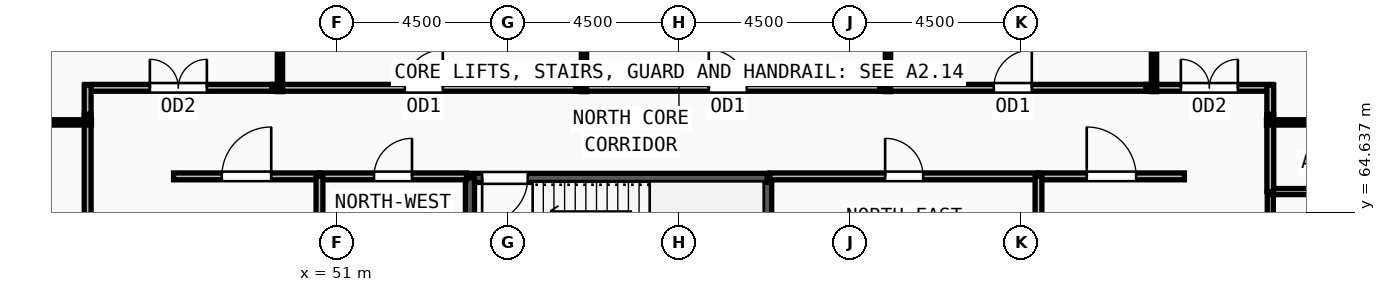
"""IFC4 building model, lengths in metres.
Left out: names, types, materials, properties, quantities, classifications, styles, units other than length and angle.
Written with IfcOpenShell. Run it as: python <this file> out.ifc"""

import sys

from ifc_helpers import new_model, si_unit, direction, frame, frame_2d, origin, place, context, subcontext, project, spatial, rectangle, extrude, source, transform, mapped, element, fill, save


model = new_model("IFC4")
c1 = context("Model", 3, precision=1e-05, world=origin(), true_north=direction((0.0, 1.0)))
c2 = subcontext(c1, "Body", "Model", "MODEL_VIEW")
j1 = project(units=[si_unit("LENGTHUNIT", "METRE"), si_unit("PLANEANGLEUNIT", "RADIAN")], contexts=[c1])
p1 = place(None, origin())
s1 = spatial("IfcSite", under=j1, at=p1, CompositionType="ELEMENT")
p2 = place(p1, origin())
s2 = spatial("IfcBuilding", under=s1, at=p2, CompositionType="ELEMENT")
p3 = place(p2, frame((0.0, 0.0, 155.25)))
s3 = spatial("IfcBuildingStorey", under=s2, at=p3, CompositionType="ELEMENT", Elevation=155.25)
p4 = place(p3, frame((62.32, 62.1, 0.0), z_axis=(0.0, 0.0, 1.0), x_axis=(0.0, 1.0, 0.0)))
e1 = element("IfcWall", 1, at=p4, inside=s3, PredefinedType="SOLIDWALL", context=c2, shape_type="SweptSolid", body=[
    extrude(rectangle(XDim=3.44, YDim=0.24, at=frame_2d((1.72, 0.0))), origin(), (0.0, 0.0, 1.0), 3.57),
])
p5 = place(p3, frame((62.32, 65.54, 0.0), z_axis=(0.0, 0.0, 1.0), x_axis=(-1.0, 0.0, 0.0)))
e2 = element("IfcWall", 2, at=p5, inside=s3, PredefinedType="SOLIDWALL", context=c2, shape_type="SweptSolid", body=[
    extrude(rectangle(XDim=7.82, YDim=0.24, at=frame_2d((3.91, 0.0))), origin(), (0.0, 0.0, 1.0), 3.57),
])
m1 = source(origin(), c2, "Body", "SweptSolid", [
    extrude(rectangle(XDim=1.2, YDim=2.2, at=frame_2d((0.6, 1.1))), frame((0.0, 0.13, 0.0), z_axis=(0.0, -1.0, 0.0), x_axis=(1.0, 0.0, 0.0)), (0.0, 0.0, 1.0), 0.26),
])
p6 = place(p5, frame((6.3, 0.0, 0.0)))
e3 = element("IfcOpeningElement", 3, at=p6, cuts=e2, PredefinedType="OPENING", context=c2, shape_type="MappedRepresentation", body=[
    mapped(m1, transform((0.0, 0.0, 0.0), x_axis=(1.0, 0.0, 0.0), y_axis=(0.0, 1.0, 0.0), z_axis=(0.0, 0.0, 1.0), scale=1.0)),
])
p7 = place(p3, frame((54.5, 65.54, 0.0), z_axis=(0.0, 0.0, 1.0), x_axis=(0.0, -1.0, 0.0)))
e4 = element("IfcWall", 4, at=p7, inside=s3, PredefinedType="SOLIDWALL", context=c2, shape_type="SweptSolid", body=[
    extrude(rectangle(XDim=3.44, YDim=0.24, at=frame_2d((1.72, 0.0))), origin(), (0.0, 0.0, 1.0), 3.57),
])
p8 = place(p3, frame((75.56, 62.44, 0.0), z_axis=(0.0, 0.0, 1.0), x_axis=(0.0, 1.0, 0.0)))
e5 = element("IfcWall", 5, at=p8, inside=s3, PredefinedType="PARTITIONING", context=c2, shape_type="SweptSolid", body=[
    extrude(rectangle(XDim=2.74, YDim=0.16, at=frame_2d((1.37, 0.0))), origin(), (0.0, 0.0, 1.0), 3.57),
])
m2 = source(origin(), c2, "Body", "SweptSolid", [
    extrude(rectangle(XDim=1.05, YDim=2.15, at=frame_2d((0.525, 1.075))), frame((0.0, 0.09, 0.0), z_axis=(0.0, -1.0, 0.0), x_axis=(1.0, 0.0, 0.0)), (0.0, 0.0, 1.0), 0.18),
])
p9 = place(p8, frame((0.845, 0.0, 0.0)))
e6 = element("IfcOpeningElement", 6, at=p9, cuts=e5, PredefinedType="OPENING", context=c2, shape_type="MappedRepresentation", body=[
    mapped(m2, transform((0.0, 0.0, 0.0), x_axis=(1.0, 0.0, 0.0), y_axis=(0.0, 1.0, 0.0), z_axis=(0.0, 0.0, 1.0), scale=1.0)),
])
p10 = place(p3, frame((50.54, 65.58, 0.0), z_axis=(0.0, 0.0, 1.0), x_axis=(1.0, 0.0, 0.0)))
e7 = element("IfcWall", 7, at=p10, inside=s3, PredefinedType="PARTITIONING", context=c2, shape_type="SweptSolid", body=[
    extrude(rectangle(XDim=3.87, YDim=0.18, at=frame_2d((1.935, 0.0))), origin(), (0.0, 0.0, 1.0), 3.57),
])
m3 = source(origin(), c2, "Body", "SweptSolid", [
    extrude(rectangle(XDim=1.0, YDim=2.2, at=frame_2d((0.5, 1.1))), frame((0.0, 0.1, 0.0), z_axis=(0.0, -1.0, 0.0), x_axis=(1.0, 0.0, 0.0)), (0.0, 0.0, 1.0), 0.2),
])
p11 = place(p10, frame((1.435, 0.0, 0.0)))
e8 = element("IfcOpeningElement", 8, at=p11, cuts=e7, PredefinedType="OPENING", context=c2, shape_type="MappedRepresentation", body=[
    mapped(m3, transform((0.0, 0.0, 0.0), x_axis=(1.0, 0.0, 0.0), y_axis=(0.0, 1.0, 0.0), z_axis=(0.0, 0.0, 1.0), scale=1.0)),
])
p12 = place(p3, frame((62.39, 65.58, 0.0), z_axis=(0.0, 0.0, 1.0), x_axis=(1.0, 0.0, 0.0)))
e9 = element("IfcWall", 9, at=p12, inside=s3, PredefinedType="PARTITIONING", context=c2, shape_type="SweptSolid", body=[
    extrude(rectangle(XDim=7.07, YDim=0.18, at=frame_2d((3.535, 0.0))), origin(), (0.0, 0.0, 1.0), 3.57),
])
p13 = place(p12, frame((3.035, 0.0, 0.0)))
e10 = element("IfcOpeningElement", 10, at=p13, cuts=e9, PredefinedType="OPENING", context=c2, shape_type="MappedRepresentation", body=[
    mapped(m3, transform((0.0, 0.0, 0.0), x_axis=(1.0, 0.0, 0.0), y_axis=(0.0, 1.0, 0.0), z_axis=(0.0, 0.0, 1.0), scale=1.0)),
])
p14 = place(p3, frame((46.7, 65.58, 0.0), z_axis=(0.0, 0.0, 1.0), x_axis=(1.0, 0.0, 0.0)))
e11 = element("IfcWall", 11, at=p14, inside=s3, PredefinedType="PARTITIONING", context=c2, shape_type="SweptSolid", body=[
    extrude(rectangle(XDim=3.84, YDim=0.18, at=frame_2d((1.92, 0.0))), origin(), (0.0, 0.0, 1.0), 3.57),
])
m4 = source(origin(), c2, "Body", "SweptSolid", [
    extrude(rectangle(XDim=1.3, YDim=2.2, at=frame_2d((0.65, 1.1))), frame((0.0, 0.1, 0.0), z_axis=(0.0, -1.0, 0.0), x_axis=(1.0, 0.0, 0.0)), (0.0, 0.0, 1.0), 0.2),
])
p15 = place(p14, frame((1.27, 0.0, 0.0)))
e12 = element("IfcOpeningElement", 12, at=p15, cuts=e11, PredefinedType="OPENING", context=c2, shape_type="MappedRepresentation", body=[
    mapped(m4, transform((0.0, 0.0, 0.0), x_axis=(1.0, 0.0, 0.0), y_axis=(0.0, 1.0, 0.0), z_axis=(0.0, 0.0, 1.0), scale=1.0)),
])
p16 = place(p3, frame((69.46, 65.58, 0.0), z_axis=(0.0, 0.0, 1.0), x_axis=(1.0, 0.0, 0.0)))
e13 = element("IfcWall", 13, at=p16, inside=s3, PredefinedType="PARTITIONING", context=c2, shape_type="SweptSolid", body=[
    extrude(rectangle(XDim=3.84, YDim=0.18, at=frame_2d((1.92, 0.0))), origin(), (0.0, 0.0, 1.0), 3.57),
])
p17 = place(p16, frame((1.27, 0.0, 0.0)))
e14 = element("IfcOpeningElement", 14, at=p17, cuts=e13, PredefinedType="OPENING", context=c2, shape_type="MappedRepresentation", body=[
    mapped(m4, transform((0.0, 0.0, 0.0), x_axis=(1.0, 0.0, 0.0), y_axis=(0.0, 1.0, 0.0), z_axis=(0.0, 0.0, 1.0), scale=1.0)),
])
p18 = place(p3, frame((72.285, 67.91, 0.0), z_axis=(0.0, 0.0, 1.0), x_axis=(1.0, 0.0, 0.0)))
e15 = element("IfcWall", 15, at=p18, inside=s3, PredefinedType="PARTITIONING", context=c2, shape_type="SweptSolid", body=[
    extrude(rectangle(XDim=3.345, YDim=0.18, at=frame_2d((1.672, 0.0))), origin(), (0.0, 0.0, 1.0), 3.57),
])
m5 = source(origin(), c2, "Body", "SweptSolid", [
    extrude(rectangle(XDim=1.5, YDim=2.2, at=frame_2d((0.75, 1.1))), frame((0.0, 0.1, 0.0), z_axis=(0.0, -1.0, 0.0), x_axis=(1.0, 0.0, 0.0)), (0.0, 0.0, 1.0), 0.2),
])
p19 = place(p18, frame((0.922, 0.0, 0.0)))
e16 = element("IfcOpeningElement", 16, at=p19, cuts=e15, PredefinedType="OPENING", context=c2, shape_type="MappedRepresentation", body=[
    mapped(m5, transform((0.0, 0.0, 0.0), x_axis=(1.0, 0.0, 0.0), y_axis=(0.0, 1.0, 0.0), z_axis=(0.0, 0.0, 1.0), scale=1.0)),
])
p20 = place(p3, frame((65.285, 67.91, 0.0), z_axis=(0.0, 0.0, 1.0), x_axis=(1.0, 0.0, 0.0)))
e17 = element("IfcWall", 17, at=p20, inside=s3, PredefinedType="PARTITIONING", context=c2, shape_type="SweptSolid", body=[
    extrude(rectangle(XDim=7.0, YDim=0.18, at=frame_2d((3.5, 0.0))), origin(), (0.0, 0.0, 1.0), 3.57),
])
p21 = place(p20, frame((3.0, 0.0, 0.0)))
e18 = element("IfcOpeningElement", 18, at=p21, cuts=e17, PredefinedType="OPENING", context=c2, shape_type="MappedRepresentation", body=[
    mapped(m3, transform((0.0, 0.0, 0.0), x_axis=(1.0, 0.0, 0.0), y_axis=(0.0, 1.0, 0.0), z_axis=(0.0, 0.0, 1.0), scale=1.0)),
])
p22 = place(p3, frame((57.285, 67.91, 0.0), z_axis=(0.0, 0.0, 1.0), x_axis=(1.0, 0.0, 0.0)))
e19 = element("IfcWall", 19, at=p22, inside=s3, PredefinedType="PARTITIONING", context=c2, shape_type="SweptSolid", body=[
    extrude(rectangle(XDim=8.0, YDim=0.18, at=frame_2d((4.0, 0.0))), origin(), (0.0, 0.0, 1.0), 3.57),
])
p23 = place(p22, frame((3.5, 0.0, 0.0)))
e20 = element("IfcOpeningElement", 20, at=p23, cuts=e19, PredefinedType="OPENING", context=c2, shape_type="MappedRepresentation", body=[
    mapped(m3, transform((0.0, 0.0, 0.0), x_axis=(1.0, 0.0, 0.0), y_axis=(0.0, 1.0, 0.0), z_axis=(0.0, 0.0, 1.0), scale=1.0)),
])
p24 = place(p3, frame((49.285, 67.91, 0.0), z_axis=(0.0, 0.0, 1.0), x_axis=(1.0, 0.0, 0.0)))
e21 = element("IfcWall", 21, at=p24, inside=s3, PredefinedType="PARTITIONING", context=c2, shape_type="SweptSolid", body=[
    extrude(rectangle(XDim=8.0, YDim=0.18, at=frame_2d((4.0, 0.0))), origin(), (0.0, 0.0, 1.0), 3.57),
])
p25 = place(p24, frame((3.5, 0.0, 0.0)))
e22 = element("IfcOpeningElement", 22, at=p25, cuts=e21, PredefinedType="OPENING", context=c2, shape_type="MappedRepresentation", body=[
    mapped(m3, transform((0.0, 0.0, 0.0), x_axis=(1.0, 0.0, 0.0), y_axis=(0.0, 1.0, 0.0), z_axis=(0.0, 0.0, 1.0), scale=1.0)),
])
p26 = place(p3, frame((44.37, 67.91, 0.0), z_axis=(0.0, 0.0, 1.0), x_axis=(1.0, 0.0, 0.0)))
e23 = element("IfcWall", 23, at=p26, inside=s3, PredefinedType="PARTITIONING", context=c2, shape_type="SweptSolid", body=[
    extrude(rectangle(XDim=4.915, YDim=0.18, at=frame_2d((2.458, 0.0))), origin(), (0.0, 0.0, 1.0), 3.57),
])
p27 = place(p26, frame((1.707, 0.0, 0.0)))
e24 = element("IfcOpeningElement", 24, at=p27, cuts=e23, PredefinedType="OPENING", context=c2, shape_type="MappedRepresentation", body=[
    mapped(m5, transform((0.0, 0.0, 0.0), x_axis=(1.0, 0.0, 0.0), y_axis=(0.0, 1.0, 0.0), z_axis=(0.0, 0.0, 1.0), scale=1.0)),
])
p28 = place(p3, frame((44.44, 60.785, 0.0), z_axis=(0.0, 0.0, 1.0), x_axis=(0.0, 1.0, 0.0)))
e25 = element("IfcWall", 25, at=p28, inside=s3, PredefinedType="PARTITIONING", context=c2, shape_type="SweptSolid", body=[
    extrude(rectangle(XDim=6.43, YDim=0.18, at=frame_2d((3.215, 0.0))), origin(), (0.0, 0.0, 1.0), 3.57),
])
p29 = place(p28, frame((2.715, 0.0, 0.0)))
e26 = element("IfcOpeningElement", 26, at=p29, cuts=e25, PredefinedType="OPENING", context=c2, shape_type="MappedRepresentation", body=[
    mapped(m3, transform((0.0, 0.0, 0.0), x_axis=(1.0, 0.0, 0.0), y_axis=(0.0, 1.0, 0.0), z_axis=(0.0, 0.0, 1.0), scale=1.0)),
])
p30 = place(p3, frame((75.56, 65.18, 0.0), z_axis=(0.0, 0.0, 1.0), x_axis=(1.0, 0.0, 0.0)))
e27 = element("IfcWall", 27, at=p30, inside=s3, PredefinedType="PARTITIONING", context=c2, shape_type="SweptSolid", body=[
    extrude(rectangle(XDim=4.46, YDim=0.16, at=frame_2d((2.23, 0.0))), origin(), (0.0, 0.0, 1.0), 3.57),
])
for number, where, z_axis, x_axis in (
    (28, (50.54, 61.95, 0.0), (0.0, 0.0, 1.0), (0.0, 1.0, 0.0)),
    (29, (69.46, 61.95, 0.0), (0.0, 0.0, 1.0), (0.0, 1.0, 0.0)),
):
    element("IfcWall", number, at=place(p3, frame(where, z_axis=z_axis, x_axis=x_axis)), inside=s3, PredefinedType="PARTITIONING", context=c2, shape_type="SweptSolid", body=[
        extrude(rectangle(XDim=3.63, YDim=0.18, at=frame_2d((1.815, 0.0))), origin(), (0.0, 0.0, 1.0), 3.57),
    ])
p31 = place(p3, frame((75.56, 67.215, 0.0), z_axis=(0.0, 0.0, 1.0), x_axis=(0.0, -1.0, 0.0)))
e30 = element("IfcWall", 30, at=p31, inside=s3, PredefinedType="PARTITIONING", context=c2, shape_type="SweptSolid", body=[
    extrude(rectangle(XDim=2.035, YDim=0.18, at=frame_2d((1.018, 0.0))), origin(), (0.0, 0.0, 1.0), 3.57),
])
for number, where, z_axis, x_axis in (
    (31, (75.56, 67.98, 0.0), (0.0, 0.0, 1.0), (0.0, -1.0, 0.0)),
    (32, (44.44, 67.215, 0.0), (0.0, 0.0, 1.0), (0.0, 1.0, 0.0)),
):
    element("IfcWall", number, at=place(p3, frame(where, z_axis=z_axis, x_axis=x_axis)), inside=s3, PredefinedType="PARTITIONING", context=c2, shape_type="SweptSolid", body=[
        extrude(rectangle(XDim=0.765, YDim=0.18, at=frame_2d((0.382, 0.0))), origin(), (0.0, 0.0, 1.0), 3.57),
    ])
p32 = place(p3, frame((44.54, 67.0, 0.0), z_axis=(0.0, 0.0, 1.0), x_axis=(-1.0, 0.0, 0.0)))
e33 = element("IfcWall", 33, at=p32, inside=s3, PredefinedType="PARTITIONING", context=c2, shape_type="SweptSolid", body=[
    extrude(rectangle(XDim=20.033, YDim=0.14, at=frame_2d((10.017, 0.0))), origin(), (0.0, 0.0, 1.0), 2.755),
])
p33 = place(p3, frame((75.46, 67.0, 0.0), z_axis=(0.0, 0.0, 1.0), x_axis=(1.0, 0.0, 0.0)))
e34 = element("IfcWall", 34, at=p33, inside=s3, PredefinedType="PARTITIONING", context=c2, shape_type="SweptSolid", body=[
    extrude(rectangle(XDim=20.046, YDim=0.14, at=frame_2d((10.023, 0.0))), origin(), (0.0, 0.0, 1.0), 2.755),
])
p34 = place(p3, frame((49.5, 67.81, 0.0), z_axis=(0.0, 0.0, 1.0), x_axis=(0.0, 1.0, 0.0)))
e35 = element("IfcWall", 35, at=p34, inside=s3, PredefinedType="PARTITIONING", context=c2, shape_type="SweptSolid", body=[
    extrude(rectangle(XDim=11.767, YDim=0.14, at=frame_2d((5.883, 0.0))), origin(), (0.0, 0.0, 1.0), 3.57),
])
p35 = place(p3, frame((57.5, 67.81, 0.0), z_axis=(0.0, 0.0, 1.0), x_axis=(0.0, 1.0, 0.0)))
e36 = element("IfcWall", 36, at=p35, inside=s3, PredefinedType="PARTITIONING", context=c2, shape_type="SweptSolid", body=[
    extrude(rectangle(XDim=12.315, YDim=0.14, at=frame_2d((6.157, 0.0))), origin(), (0.0, 0.0, 1.0), 3.57),
])
p36 = place(p3, frame((65.5, 67.81, 0.0), z_axis=(0.0, 0.0, 1.0), x_axis=(0.0, 1.0, 0.0)))
e37 = element("IfcWall", 37, at=p36, inside=s3, PredefinedType="PARTITIONING", context=c2, shape_type="SweptSolid", body=[
    extrude(rectangle(XDim=11.835, YDim=0.14, at=frame_2d((5.917, 0.0))), origin(), (0.0, 0.0, 1.0), 3.57),
])
p37 = place(p3, frame((72.5, 67.81, 0.0), z_axis=(0.0, 0.0, 1.0), x_axis=(0.0, 1.0, 0.0)))
e38 = element("IfcWall", 38, at=p37, inside=s3, PredefinedType="PARTITIONING", context=c2, shape_type="SweptSolid", body=[
    extrude(rectangle(XDim=11.416, YDim=0.14, at=frame_2d((5.708, 0.0))), origin(), (0.0, 0.0, 1.0), 3.57),
])
m6 = source(origin(), c2, "Body", "SweptSolid", [
    extrude(rectangle(XDim=1.2, YDim=2.2, at=frame_2d((0.6, 1.1))), frame((0.0, 0.025, 0.0), z_axis=(0.0, -1.0, 0.0), x_axis=(1.0, 0.0, 0.0)), (0.0, 0.0, 1.0), 0.05),
])
p38 = place(p6, origin())
e39 = element("IfcDoor", 39, at=p38, inside=s3, OperationType="SINGLE_SWING_RIGHT", PredefinedType="DOOR", context=c2, shape_type="MappedRepresentation", body=[
    mapped(m6, transform((0.0, 0.0, 0.0), x_axis=(1.0, 0.0, 0.0), y_axis=(0.0, 1.0, 0.0), z_axis=(0.0, 0.0, 1.0), scale=1.0)),
])
fill(e3, e39)
m7 = source(origin(), c2, "Body", "SweptSolid", [
    extrude(rectangle(XDim=1.0, YDim=2.2, at=frame_2d((0.5, 1.1))), frame((0.0, 0.025, 0.0), z_axis=(0.0, -1.0, 0.0), x_axis=(1.0, 0.0, 0.0)), (0.0, 0.0, 1.0), 0.05),
])
p39 = place(p11, origin())
e40 = element("IfcDoor", 40, at=p39, inside=s3, OperationType="SINGLE_SWING_RIGHT", PredefinedType="DOOR", context=c2, shape_type="MappedRepresentation", body=[
    mapped(m7, transform((0.0, 0.0, 0.0), x_axis=(1.0, 0.0, 0.0), y_axis=(0.0, 1.0, 0.0), z_axis=(0.0, 0.0, 1.0), scale=1.0)),
])
fill(e8, e40)
p40 = place(p13, origin())
e41 = element("IfcDoor", 41, at=p40, inside=s3, OperationType="SINGLE_SWING_LEFT", PredefinedType="DOOR", context=c2, shape_type="MappedRepresentation", body=[
    mapped(m7, transform((0.0, 0.0, 0.0), x_axis=(1.0, 0.0, 0.0), y_axis=(0.0, 1.0, 0.0), z_axis=(0.0, 0.0, 1.0), scale=1.0)),
])
fill(e10, e41)
m8 = source(origin(), c2, "Body", "SweptSolid", [
    extrude(rectangle(XDim=1.3, YDim=2.2, at=frame_2d((0.65, 1.1))), frame((0.0, 0.025, 0.0), z_axis=(0.0, -1.0, 0.0), x_axis=(1.0, 0.0, 0.0)), (0.0, 0.0, 1.0), 0.05),
])
p41 = place(p15, origin())
e42 = element("IfcDoor", 42, at=p41, inside=s3, OperationType="SINGLE_SWING_RIGHT", PredefinedType="DOOR", context=c2, shape_type="MappedRepresentation", body=[
    mapped(m8, transform((0.0, 0.0, 0.0), x_axis=(1.0, 0.0, 0.0), y_axis=(0.0, 1.0, 0.0), z_axis=(0.0, 0.0, 1.0), scale=1.0)),
])
fill(e12, e42)
p42 = place(p17, origin())
e43 = element("IfcDoor", 43, at=p42, inside=s3, OperationType="SINGLE_SWING_LEFT", PredefinedType="DOOR", context=c2, shape_type="MappedRepresentation", body=[
    mapped(m8, transform((0.0, 0.0, 0.0), x_axis=(1.0, 0.0, 0.0), y_axis=(0.0, 1.0, 0.0), z_axis=(0.0, 0.0, 1.0), scale=1.0)),
])
fill(e14, e43)
m9 = source(origin(), c2, "Body", "SweptSolid", [
    extrude(rectangle(XDim=1.5, YDim=2.2, at=frame_2d((0.75, 1.1))), frame((0.0, 0.025, 0.0), z_axis=(0.0, -1.0, 0.0), x_axis=(1.0, 0.0, 0.0)), (0.0, 0.0, 1.0), 0.05),
])
p43 = place(p19, origin())
e44 = element("IfcDoor", 44, at=p43, inside=s3, OperationType="DOUBLE_DOOR_SINGLE_SWING", PredefinedType="DOOR", context=c2, shape_type="MappedRepresentation", body=[
    mapped(m9, transform((0.0, 0.0, 0.0), x_axis=(1.0, 0.0, 0.0), y_axis=(0.0, 1.0, 0.0), z_axis=(0.0, 0.0, 1.0), scale=1.0)),
])
fill(e16, e44)
p44 = place(p21, origin())
e45 = element("IfcDoor", 45, at=p44, inside=s3, OperationType="SINGLE_SWING_RIGHT", PredefinedType="DOOR", context=c2, shape_type="MappedRepresentation", body=[
    mapped(m7, transform((0.0, 0.0, 0.0), x_axis=(1.0, 0.0, 0.0), y_axis=(0.0, 1.0, 0.0), z_axis=(0.0, 0.0, 1.0), scale=1.0)),
])
fill(e18, e45)
p45 = place(p23, origin())
e46 = element("IfcDoor", 46, at=p45, inside=s3, OperationType="SINGLE_SWING_LEFT", PredefinedType="DOOR", context=c2, shape_type="MappedRepresentation", body=[
    mapped(m7, transform((0.0, 0.0, 0.0), x_axis=(1.0, 0.0, 0.0), y_axis=(0.0, 1.0, 0.0), z_axis=(0.0, 0.0, 1.0), scale=1.0)),
])
fill(e20, e46)
p46 = place(p25, origin())
e47 = element("IfcDoor", 47, at=p46, inside=s3, OperationType="SINGLE_SWING_RIGHT", PredefinedType="DOOR", context=c2, shape_type="MappedRepresentation", body=[
    mapped(m7, transform((0.0, 0.0, 0.0), x_axis=(1.0, 0.0, 0.0), y_axis=(0.0, 1.0, 0.0), z_axis=(0.0, 0.0, 1.0), scale=1.0)),
])
fill(e22, e47)
p47 = place(p27, origin())
e48 = element("IfcDoor", 48, at=p47, inside=s3, OperationType="DOUBLE_DOOR_SINGLE_SWING", PredefinedType="DOOR", context=c2, shape_type="MappedRepresentation", body=[
    mapped(m9, transform((0.0, 0.0, 0.0), x_axis=(1.0, 0.0, 0.0), y_axis=(0.0, 1.0, 0.0), z_axis=(0.0, 0.0, 1.0), scale=1.0)),
])
fill(e24, e48)
save(model, sys.argv[1])
